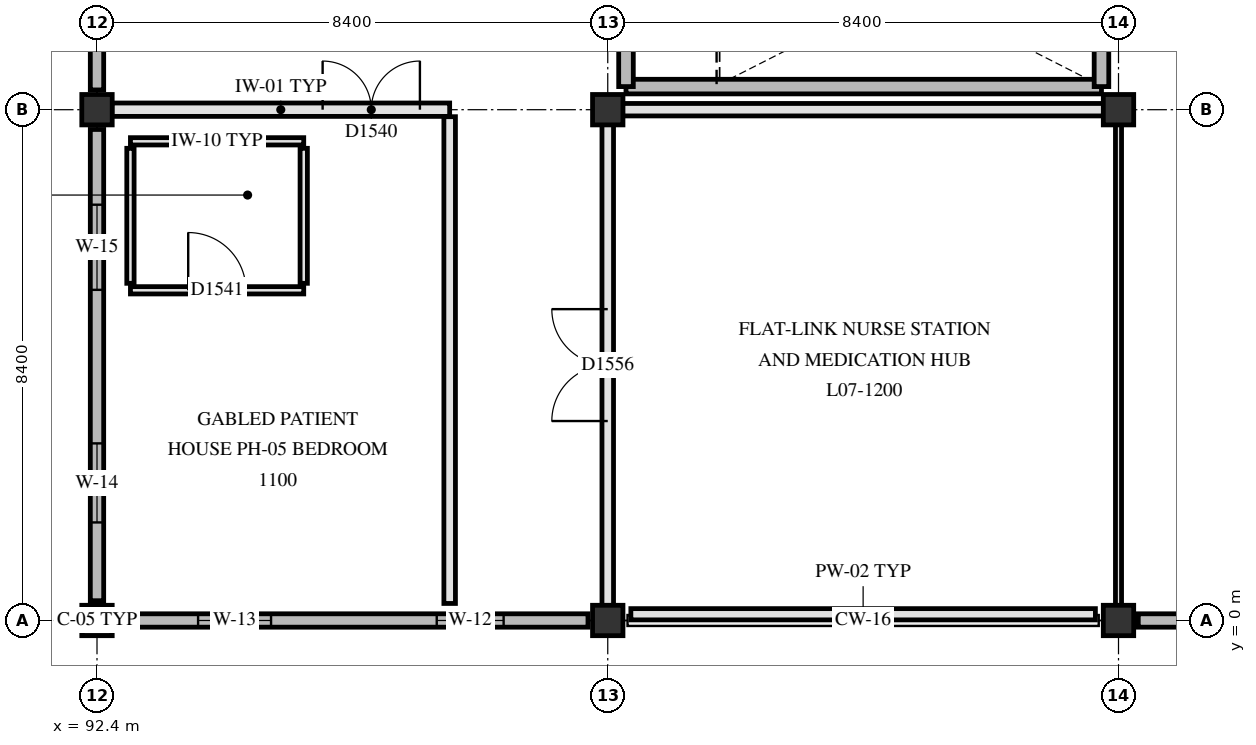
"""IFC4 building model, lengths in metres.
Left out: names, types, materials, properties, quantities, classifications, styles, units other than length and angle.
Written with IfcOpenShell. Run it as: python <this file> out.ifc"""

import sys

from ifc_helpers import new_model, si_unit, direction, frame, frame_2d, origin, origin_2d, place, context, subcontext, project, spatial, polyline, rectangle, outline, extrude, element, fill, save


model = new_model("IFC4")
c1 = context("Model", 3, precision=1e-05, world=origin(), true_north=direction((0.0, 1.0)))
c2 = subcontext(c1, "Body", "Model", "MODEL_VIEW")
j1 = project(units=[si_unit("LENGTHUNIT", "METRE"), si_unit("PLANEANGLEUNIT", "RADIAN")], contexts=[c1])
p1 = place(None, origin())
s1 = spatial("IfcSite", under=j1, at=p1, CompositionType="ELEMENT")
p2 = place(p1, origin())
s2 = spatial("IfcBuilding", under=s1, at=p2, CompositionType="ELEMENT")
p3 = place(p2, frame((0.0, 0.0, 30.3)))
s3 = spatial("IfcBuildingStorey", under=s2, at=p3, CompositionType="ELEMENT", Elevation=30.3)
for number, where, z_axis, x_axis in (
    (1, (92.4, 0.0, 0.0), (0.0, 0.0, 1.0), (1.0, 0.0, 0.0)),
    (2, (92.4, 8.4, 0.0), (0.0, 0.0, 1.0), (1.0, 0.0, 0.0)),
    (3, (100.8, 0.0, 0.0), (0.0, 0.0, 1.0), (1.0, 0.0, 0.0)),
    (4, (100.8, 8.4, 0.0), (0.0, 0.0, 1.0), (1.0, 0.0, 0.0)),
    (5, (109.2, 0.0, 0.0), (0.0, 0.0, 1.0), (1.0, 0.0, 0.0)),
    (6, (109.2, 8.4, 0.0), (0.0, 0.0, 1.0), (1.0, 0.0, 0.0)),
):
    element("IfcColumn", number, at=place(p3, frame(where, z_axis=z_axis, x_axis=x_axis)), inside=s3, PredefinedType="COLUMN", context=c2, shape_type="SweptSolid", body=[
        extrude(rectangle(XDim=0.5, YDim=0.5, at=origin_2d()), origin(), (0.0, 0.0, 1.0), 3.9),
    ])
p4 = place(p3, frame((117.275, 0.0, 0.0), z_axis=(0.0, 0.0, 1.0), x_axis=(-1.0, 0.0, 0.0)))
e7 = element("IfcWall", 7, at=p4, inside=s3, PredefinedType="SOLIDWALL", context=c2, shape_type="SweptSolid", body=[
    extrude(outline(polyline([(0.0, 0.0), (7.75, 0.0), (7.75, 3.4), (3.875, 5.76), (0.0, 3.4), (0.0, 0.0)])), frame((0.0, 0.11, 0.0), z_axis=(0.0, -1.0, 0.0), x_axis=(1.0, 0.0, 0.0)), (0.0, 0.0, 1.0), 0.22),
])
p5 = place(p4, frame((1.012, 0.0, 0.85)))
e8 = element("IfcOpeningElement", 8, at=p5, cuts=e7, PredefinedType="OPENING", context=c2, shape_type="SweptSolid", body=[
    extrude(rectangle(XDim=1.85, YDim=1.3, at=frame_2d((0.925, 0.65))), frame((0.0, 0.12, 0.0), z_axis=(0.0, -1.0, 0.0), x_axis=(1.0, 0.0, 0.0)), (0.0, 0.0, 1.0), 0.24),
])
p6 = place(p4, frame((5.312, 0.0, 0.85)))
e9 = element("IfcOpeningElement", 9, at=p6, cuts=e7, PredefinedType="OPENING", context=c2, shape_type="SweptSolid", body=[
    extrude(rectangle(XDim=1.0, YDim=1.42, at=frame_2d((0.5, 0.71))), frame((0.0, 0.12, 0.0), z_axis=(0.0, -1.0, 0.0), x_axis=(1.0, 0.0, 0.0)), (0.0, 0.0, 1.0), 0.24),
])
p7 = place(p3, frame((100.475, 0.0, 0.0), z_axis=(0.0, 0.0, 1.0), x_axis=(-1.0, 0.0, 0.0)))
e10 = element("IfcWall", 10, at=p7, inside=s3, PredefinedType="SOLIDWALL", context=c2, shape_type="SweptSolid", body=[
    extrude(outline(polyline([(0.0, 0.0), (7.75, 0.0), (7.75, 3.4), (3.875, 5.76), (0.0, 3.4), (0.0, 0.0)])), frame((0.0, 0.11, 0.0), z_axis=(0.0, -1.0, 0.0), x_axis=(1.0, 0.0, 0.0)), (0.0, 0.0, 1.0), 0.22),
])
p8 = place(p7, frame((1.387, 0.0, 0.85)))
e11 = element("IfcOpeningElement", 11, at=p8, cuts=e10, PredefinedType="OPENING", context=c2, shape_type="SweptSolid", body=[
    extrude(rectangle(XDim=1.1, YDim=1.42, at=frame_2d((0.55, 0.71))), frame((0.0, 0.12, 0.0), z_axis=(0.0, -1.0, 0.0), x_axis=(1.0, 0.0, 0.0)), (0.0, 0.0, 1.0), 0.24),
])
p9 = place(p7, frame((5.212, 0.0, 0.85)))
e12 = element("IfcOpeningElement", 12, at=p9, cuts=e10, PredefinedType="OPENING", context=c2, shape_type="SweptSolid", body=[
    extrude(rectangle(XDim=1.2, YDim=1.42, at=frame_2d((0.6, 0.71))), frame((0.0, 0.12, 0.0), z_axis=(0.0, -1.0, 0.0), x_axis=(1.0, 0.0, 0.0)), (0.0, 0.0, 1.0), 0.24),
])
p10 = place(p3, frame((92.4, 0.325, 0.0), z_axis=(0.0, 0.0, 1.0), x_axis=(0.0, 1.0, 0.0)))
e13 = element("IfcWall", 13, at=p10, inside=s3, PredefinedType="SOLIDWALL", context=c2, shape_type="SweptSolid", body=[
    extrude(rectangle(XDim=7.75, YDim=0.22, at=frame_2d((3.875, 0.0))), origin(), (0.0, 0.0, 1.0), 3.42),
])
p11 = place(p10, frame((1.288, 0.0, 0.85)))
e14 = element("IfcOpeningElement", 14, at=p11, cuts=e13, PredefinedType="OPENING", context=c2, shape_type="SweptSolid", body=[
    extrude(rectangle(XDim=1.3, YDim=1.42, at=frame_2d((0.65, 0.71))), frame((0.0, 0.12, 0.0), z_axis=(0.0, -1.0, 0.0), x_axis=(1.0, 0.0, 0.0)), (0.0, 0.0, 1.0), 0.24),
])
p12 = place(p10, frame((5.113, 0.0, 0.85)))
e15 = element("IfcOpeningElement", 15, at=p12, cuts=e13, PredefinedType="OPENING", context=c2, shape_type="SweptSolid", body=[
    extrude(rectangle(XDim=1.4, YDim=1.42, at=frame_2d((0.7, 0.71))), frame((0.0, 0.12, 0.0), z_axis=(0.0, -1.0, 0.0), x_axis=(1.0, 0.0, 0.0)), (0.0, 0.0, 1.0), 0.24),
])
p13 = place(p3, frame((92.4, 8.725, 0.0), z_axis=(0.0, 0.0, 1.0), x_axis=(0.0, 1.0, 0.0)))
e16 = element("IfcWall", 16, at=p13, inside=s3, PredefinedType="SOLIDWALL", context=c2, shape_type="SweptSolid", body=[
    extrude(rectangle(XDim=7.75, YDim=0.22, at=frame_2d((3.875, 0.0))), origin(), (0.0, 0.0, 1.0), 3.42),
])
p14 = place(p13, frame((1.188, 0.0, 0.85)))
e17 = element("IfcOpeningElement", 17, at=p14, cuts=e16, PredefinedType="OPENING", context=c2, shape_type="SweptSolid", body=[
    extrude(rectangle(XDim=1.5, YDim=1.42, at=frame_2d((0.75, 0.71))), frame((0.0, 0.12, 0.0), z_axis=(0.0, -1.0, 0.0), x_axis=(1.0, 0.0, 0.0)), (0.0, 0.0, 1.0), 0.24),
])
p15 = place(p13, frame((5.012, 0.0, 0.85)))
e18 = element("IfcOpeningElement", 18, at=p15, cuts=e16, PredefinedType="OPENING", context=c2, shape_type="SweptSolid", body=[
    extrude(rectangle(XDim=1.6, YDim=1.42, at=frame_2d((0.8, 0.71))), frame((0.0, 0.12, 0.0), z_axis=(0.0, -1.0, 0.0), x_axis=(1.0, 0.0, 0.0)), (0.0, 0.0, 1.0), 0.24),
])
p16 = place(p3, frame((108.82, 0.103, 3.88), z_axis=(0.0, 0.0, 1.0), x_axis=(-1.0, 0.0, 0.0)))
e19 = element("IfcWall", 19, at=p16, inside=s3, PredefinedType="PARAPET", context=c2, shape_type="SweptSolid", body=[
    extrude(rectangle(XDim=7.64, YDim=0.185, at=frame_2d((3.82, 0.0))), origin(), (0.0, 0.0, 1.0), 0.47),
])
p17 = place(p3, frame((101.1, 8.78, 0.0), z_axis=(0.0, 0.0, 1.0), x_axis=(1.0, 0.0, 0.0)))
e20 = element("IfcWall", 20, at=p17, inside=s3, PredefinedType="SHEAR", context=c2, shape_type="SweptSolid", body=[
    extrude(rectangle(XDim=7.82, YDim=0.24, at=frame_2d((3.91, 0.0))), origin(), (0.0, 0.0, 1.0), 3.66),
])
for number, where, z_axis, x_axis in (
    (21, (101.1, 8.78, 0.0), (0.0, 0.0, 1.0), (0.0, 1.0, 0.0)),
    (22, (108.92, 8.78, 0.0), (0.0, 0.0, 1.0), (0.0, 1.0, 0.0)),
):
    element("IfcWall", number, at=place(p3, frame(where, z_axis=z_axis, x_axis=x_axis)), inside=s3, PredefinedType="SHEAR", context=c2, shape_type="SweptSolid", body=[
        extrude(rectangle(XDim=3.32, YDim=0.24, at=frame_2d((1.66, 0.0))), origin(), (0.0, 0.0, 1.0), 3.66),
    ])
p18 = place(p3, frame((92.95, 5.43, 0.0), z_axis=(0.0, 0.0, 1.0), x_axis=(1.0, 0.0, 0.0)))
e23 = element("IfcWall", 23, at=p18, inside=s3, PredefinedType="PARTITIONING", context=c2, shape_type="SweptSolid", body=[
    extrude(rectangle(XDim=2.85, YDim=0.12, at=frame_2d((1.425, 0.0))), origin(), (0.0, 0.0, 1.0), 3.65),
])
p19 = place(p18, frame((0.95, 0.0, 0.0)))
e24 = element("IfcOpeningElement", 24, at=p19, cuts=e23, PredefinedType="OPENING", context=c2, shape_type="SweptSolid", body=[
    extrude(rectangle(XDim=0.95, YDim=2.1, at=frame_2d((0.475, 1.05))), frame((0.0, 0.07, 0.0), z_axis=(0.0, -1.0, 0.0), x_axis=(1.0, 0.0, 0.0)), (0.0, 0.0, 1.0), 0.14),
])
p20 = place(p3, frame((92.95, 7.88, 0.0), z_axis=(0.0, 0.0, 1.0), x_axis=(1.0, 0.0, 0.0)))
e25 = element("IfcWall", 25, at=p20, inside=s3, PredefinedType="PARTITIONING", context=c2, shape_type="SweptSolid", body=[
    extrude(rectangle(XDim=2.85, YDim=0.12, at=frame_2d((1.425, 0.0))), origin(), (0.0, 0.0, 1.0), 3.65),
])
p21 = place(p3, frame((92.645, 8.4, 0.0), z_axis=(0.0, 0.0, 1.0), x_axis=(1.0, 0.0, 0.0)))
e26 = element("IfcWall", 26, at=p21, inside=s3, PredefinedType="PARTITIONING", context=c2, shape_type="SweptSolid", body=[
    extrude(rectangle(XDim=5.555, YDim=0.22, at=frame_2d((2.777, 0.0))), origin(), (0.0, 0.0, 1.0), 3.25),
])
p22 = place(p21, frame((3.466, 0.0, 0.0)))
e27 = element("IfcOpeningElement", 27, at=p22, cuts=e26, PredefinedType="OPENING", context=c2, shape_type="SweptSolid", body=[
    extrude(rectangle(XDim=1.6, YDim=2.25, at=frame_2d((0.8, 1.125))), frame((0.0, 0.12, 0.0), z_axis=(0.0, -1.0, 0.0), x_axis=(1.0, 0.0, 0.0)), (0.0, 0.0, 1.0), 0.24),
])
p23 = place(p3, frame((101.045, 8.4, 0.0), z_axis=(0.0, 0.0, 1.0), x_axis=(1.0, 0.0, 0.0)))
e28 = element("IfcWall", 28, at=p23, inside=s3, PredefinedType="PARTITIONING", context=c2, shape_type="SweptSolid", body=[
    extrude(rectangle(XDim=7.91, YDim=0.205, at=frame_2d((3.955, 0.0))), origin(), (0.0, 0.0, 1.0), 3.25),
])
for number, where, z_axis, x_axis in (
    (29, (92.95, 5.545, 0.0), (0.0, 0.0, 1.0), (0.0, 1.0, 0.0)),
    (30, (95.8, 5.545, 0.0), (0.0, 0.0, 1.0), (0.0, 1.0, 0.0)),
):
    element("IfcWall", number, at=place(p3, frame(where, z_axis=z_axis, x_axis=x_axis)), inside=s3, PredefinedType="PARTITIONING", context=c2, shape_type="SweptSolid", body=[
        extrude(rectangle(XDim=2.22, YDim=0.12, at=frame_2d((1.11, 0.0))), origin(), (0.0, 0.0, 1.0), 3.41),
    ])
p24 = place(p3, frame((98.2, 0.28, 0.0), z_axis=(0.0, 0.0, 1.0), x_axis=(0.0, 1.0, 0.0)))
e31 = element("IfcWall", 31, at=p24, inside=s3, PredefinedType="PARTITIONING", context=c2, shape_type="SweptSolid", body=[
    extrude(rectangle(XDim=8.005, YDim=0.19, at=frame_2d((4.002, 0.0))), origin(), (0.0, 0.0, 1.0), 3.41),
])
p25 = place(p3, frame((100.8, 0.245, 0.0), z_axis=(0.0, 0.0, 1.0), x_axis=(0.0, 1.0, 0.0)))
e32 = element("IfcWall", 32, at=p25, inside=s3, PredefinedType="PARTITIONING", context=c2, shape_type="SweptSolid", body=[
    extrude(rectangle(XDim=7.91, YDim=0.19, at=frame_2d((3.955, 0.0))), origin(), (0.0, 0.0, 1.0), 3.25),
])
p26 = place(p25, frame((3.035, 0.0, 0.0)))
e33 = element("IfcOpeningElement", 33, at=p26, cuts=e32, PredefinedType="OPENING", context=c2, shape_type="SweptSolid", body=[
    extrude(rectangle(XDim=1.84, YDim=2.28, at=frame_2d((0.92, 1.14))), frame((0.0, 0.105, 0.0), z_axis=(0.0, -1.0, 0.0), x_axis=(1.0, 0.0, 0.0)), (0.0, 0.0, 1.0), 0.21),
])
p27 = place(p3, frame((109.2, 0.245, 0.0), z_axis=(0.0, 0.0, 1.0), x_axis=(0.0, 1.0, 0.0)))
e34 = element("IfcWall", 34, at=p27, inside=s3, PredefinedType="PARTITIONING", context=c2, shape_type="SweptSolid", body=[
    extrude(rectangle(XDim=7.91, YDim=0.1, at=frame_2d((3.955, 0.0))), origin(), (0.0, 0.0, 1.0), 3.25),
])
p28 = place(p8, origin())
e35 = element("IfcWindow", 35, at=p28, inside=s3, PartitioningType="SINGLE_PANEL", PredefinedType="WINDOW", context=c2, shape_type="SweptSolid", body=[
    extrude(rectangle(XDim=1.1, YDim=1.42, at=frame_2d((0.55, 0.71))), frame((0.0, 0.03, 0.0), z_axis=(0.0, -1.0, 0.0), x_axis=(1.0, 0.0, 0.0)), (0.0, 0.0, 1.0), 0.06),
])
fill(e11, e35)
p29 = place(p9, origin())
e36 = element("IfcWindow", 36, at=p29, inside=s3, PartitioningType="SINGLE_PANEL", PredefinedType="WINDOW", context=c2, shape_type="SweptSolid", body=[
    extrude(rectangle(XDim=1.2, YDim=1.42, at=frame_2d((0.6, 0.71))), frame((0.0, 0.03, 0.0), z_axis=(0.0, -1.0, 0.0), x_axis=(1.0, 0.0, 0.0)), (0.0, 0.0, 1.0), 0.06),
])
fill(e12, e36)
p30 = place(p11, origin())
e37 = element("IfcWindow", 37, at=p30, inside=s3, PartitioningType="SINGLE_PANEL", PredefinedType="WINDOW", context=c2, shape_type="SweptSolid", body=[
    extrude(rectangle(XDim=1.3, YDim=1.42, at=frame_2d((0.65, 0.71))), frame((0.0, 0.03, 0.0), z_axis=(0.0, -1.0, 0.0), x_axis=(1.0, 0.0, 0.0)), (0.0, 0.0, 1.0), 0.06),
])
fill(e14, e37)
p31 = place(p12, origin())
e38 = element("IfcWindow", 38, at=p31, inside=s3, PartitioningType="SINGLE_PANEL", PredefinedType="WINDOW", context=c2, shape_type="SweptSolid", body=[
    extrude(rectangle(XDim=1.4, YDim=1.42, at=frame_2d((0.7, 0.71))), frame((0.0, 0.03, 0.0), z_axis=(0.0, -1.0, 0.0), x_axis=(1.0, 0.0, 0.0)), (0.0, 0.0, 1.0), 0.06),
])
fill(e15, e38)
p32 = place(p22, origin())
e39 = element("IfcDoor", 39, at=p32, inside=s3, OperationType="DOUBLE_SWING_LEFT", PredefinedType="DOOR", context=c2, shape_type="SweptSolid", body=[
    extrude(rectangle(XDim=1.6, YDim=2.25, at=frame_2d((0.8, 1.125))), frame((0.0, 0.025, 0.0), z_axis=(0.0, -1.0, 0.0), x_axis=(1.0, 0.0, 0.0)), (0.0, 0.0, 1.0), 0.05),
])
fill(e27, e39)
p33 = place(p19, origin())
e40 = element("IfcDoor", 40, at=p33, inside=s3, OperationType="SINGLE_SWING_LEFT", PredefinedType="DOOR", context=c2, shape_type="SweptSolid", body=[
    extrude(rectangle(XDim=0.95, YDim=2.1, at=frame_2d((0.475, 1.05))), frame((0.0, 0.025, 0.0), z_axis=(0.0, -1.0, 0.0), x_axis=(1.0, 0.0, 0.0)), (0.0, 0.0, 1.0), 0.05),
])
fill(e24, e40)
p34 = place(p26, origin())
e41 = element("IfcDoor", 41, at=p34, inside=s3, OperationType="DOUBLE_SWING_LEFT", PredefinedType="DOOR", context=c2, shape_type="SweptSolid", body=[
    extrude(rectangle(XDim=1.84, YDim=2.28, at=frame_2d((0.92, 1.14))), frame((0.0, 0.025, 0.0), z_axis=(0.0, -1.0, 0.0), x_axis=(1.0, 0.0, 0.0)), (0.0, 0.0, 1.0), 0.05),
])
fill(e33, e41)
save(model, sys.argv[1])
